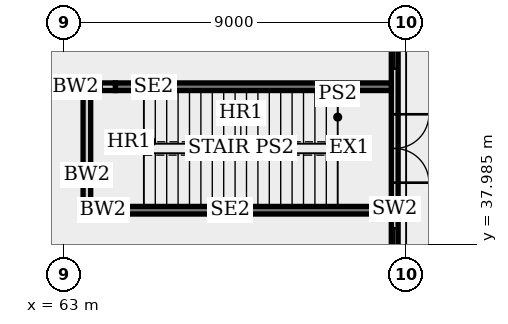
"""IFC4 building model, lengths in metres.
Left out: names, types, materials, properties, quantities, classifications, styles, units other than length and angle.
Written with IfcOpenShell. Run it as: python <this file> out.ifc"""

import sys

from ifc_helpers import new_model, si_unit, direction, frame, frame_2d, origin, place, context, subcontext, project, spatial, rectangle, extrude, element, fill, save


model = new_model("IFC4")
c1 = context("Model", 3, precision=1e-05, world=origin(), true_north=direction((0.0, 1.0)))
c2 = subcontext(c1, "Body", "Model", "MODEL_VIEW")
j1 = project(units=[si_unit("LENGTHUNIT", "METRE"), si_unit("PLANEANGLEUNIT", "RADIAN")], contexts=[c1])
p1 = place(None, origin())
s1 = spatial("IfcSite", under=j1, at=p1, CompositionType="ELEMENT")
p2 = place(p1, origin())
s2 = spatial("IfcBuilding", under=s1, at=p2, CompositionType="ELEMENT")
p3 = place(p2, origin())
s3 = spatial("IfcBuildingStorey", under=s2, at=p3, CompositionType="ELEMENT", Elevation=0.0)
p4 = place(p3, frame((71.7, 36.4, 0.0), z_axis=(0.0, 0.0, 1.0), x_axis=(0.0, 1.0, 0.0)))
e1 = element("IfcWall", 1, at=p4, inside=s3, PredefinedType="SOLIDWALL", context=c2, shape_type="SweptSolid", body=[
    extrude(rectangle(XDim=8.2, YDim=0.18, at=frame_2d((4.1, 0.0))), origin(), (0.0, 0.0, 1.0), 4.3),
])
p5 = place(p4, frame((3.2, 0.0, 0.0)))
e2 = element("IfcOpeningElement", 2, at=p5, cuts=e1, PredefinedType="OPENING", context=c2, shape_type="SweptSolid", body=[
    extrude(rectangle(XDim=1.8, YDim=2.4, at=frame_2d((0.9, 1.2))), frame((0.0, 0.1, 0.0), z_axis=(0.0, -1.0, 0.0), x_axis=(1.0, 0.0, 0.0)), (0.0, 0.0, 1.0), 0.2),
])
p6 = place(p4, frame((0.5, 0.0, 0.3)))
e3 = element("IfcOpeningElement", 3, at=p6, cuts=e1, PredefinedType="OPENING", context=c2, shape_type="SweptSolid", body=[
    extrude(rectangle(XDim=1.5, YDim=2.4, at=frame_2d((0.75, 1.2))), frame((0.0, 0.1, 0.0), z_axis=(0.0, -1.0, 0.0), x_axis=(1.0, 0.0, 0.0)), (0.0, 0.0, 1.0), 0.2),
])
p7 = place(p4, frame((6.2, 0.0, 0.3)))
e4 = element("IfcOpeningElement", 4, at=p7, cuts=e1, PredefinedType="OPENING", context=c2, shape_type="SweptSolid", body=[
    extrude(rectangle(XDim=1.5, YDim=2.4, at=frame_2d((0.75, 1.2))), frame((0.0, 0.1, 0.0), z_axis=(0.0, -1.0, 0.0), x_axis=(1.0, 0.0, 0.0)), (0.0, 0.0, 1.0), 0.2),
])
for number, where, z_axis, x_axis in (
    (5, (71.61, 42.125, 0.0), (0.0, 0.0, 1.0), (-1.0, 0.0, 0.0)),
    (6, (71.61, 38.875, 0.0), (0.0, 0.0, 1.0), (-1.0, 0.0, 0.0)),
):
    element("IfcWall", number, at=place(p3, frame(where, z_axis=z_axis, x_axis=x_axis)), inside=s3, PredefinedType="SOLIDWALL", context=c2, shape_type="SweptSolid", body=[
        extrude(rectangle(XDim=7.26, YDim=0.2, at=frame_2d((3.63, 0.0))), origin(), (0.0, 0.0, 1.0), 5.4),
    ])
for number, where, z_axis, x_axis in (
    (7, (64.35, 42.125, 0.0), (0.0, 0.0, 1.0), (-1.0, 0.0, 0.0)),
    (8, (64.35, 38.875, 0.0), (0.0, 0.0, 1.0), (-1.0, 0.0, 0.0)),
):
    element("IfcWall", number, at=place(p3, frame(where, z_axis=z_axis, x_axis=x_axis)), inside=s3, PredefinedType="SOLIDWALL", context=c2, shape_type="SweptSolid", body=[
        extrude(rectangle(XDim=0.65, YDim=0.2, at=frame_2d((0.325, 0.0))), origin(), (0.0, 0.0, 1.0), 5.4),
    ])
p8 = place(p3, frame((63.6, 42.225, 0.0), z_axis=(0.0, 0.0, 1.0), x_axis=(0.0, -1.0, 0.0)))
e9 = element("IfcWall", 9, at=p8, inside=s3, PredefinedType="SOLIDWALL", context=c2, shape_type="SweptSolid", body=[
    extrude(rectangle(XDim=3.45, YDim=0.2, at=frame_2d((1.725, 0.0))), origin(), (0.0, 0.0, 1.0), 4.3),
])
p9 = place(p5, frame((1.8, 0.0, 0.0), z_axis=(0.0, 0.0, 1.0), x_axis=(-1.0, 0.0, 0.0)))
e10 = element("IfcDoor", 10, at=p9, inside=s3, OperationType="DOUBLE_DOOR_SINGLE_SWING", PredefinedType="DOOR", context=c2, shape_type="SweptSolid", body=[
    extrude(rectangle(XDim=1.8, YDim=2.4, at=frame_2d((0.9, 1.2))), frame((0.0, 0.035, 0.0), z_axis=(0.0, -1.0, 0.0), x_axis=(1.0, 0.0, 0.0)), (0.0, 0.0, 1.0), 0.07),
])
fill(e2, e10)
p10 = place(p6, origin())
e11 = element("IfcWindow", 11, at=p10, inside=s3, PartitioningType="SINGLE_PANEL", PredefinedType="WINDOW", context=c2, shape_type="SweptSolid", body=[
    extrude(rectangle(XDim=1.5, YDim=2.4, at=frame_2d((0.75, 1.2))), frame((0.0, 0.03, 0.0), z_axis=(0.0, -1.0, 0.0), x_axis=(1.0, 0.0, 0.0)), (0.0, 0.0, 1.0), 0.06),
])
fill(e3, e11)
p11 = place(p7, origin())
e12 = element("IfcWindow", 12, at=p11, inside=s3, PartitioningType="SINGLE_PANEL", PredefinedType="WINDOW", context=c2, shape_type="SweptSolid", body=[
    extrude(rectangle(XDim=1.5, YDim=2.4, at=frame_2d((0.75, 1.2))), frame((0.0, 0.03, 0.0), z_axis=(0.0, -1.0, 0.0), x_axis=(1.0, 0.0, 0.0)), (0.0, 0.0, 1.0), 0.06),
])
fill(e4, e12)
save(model, sys.argv[1])
